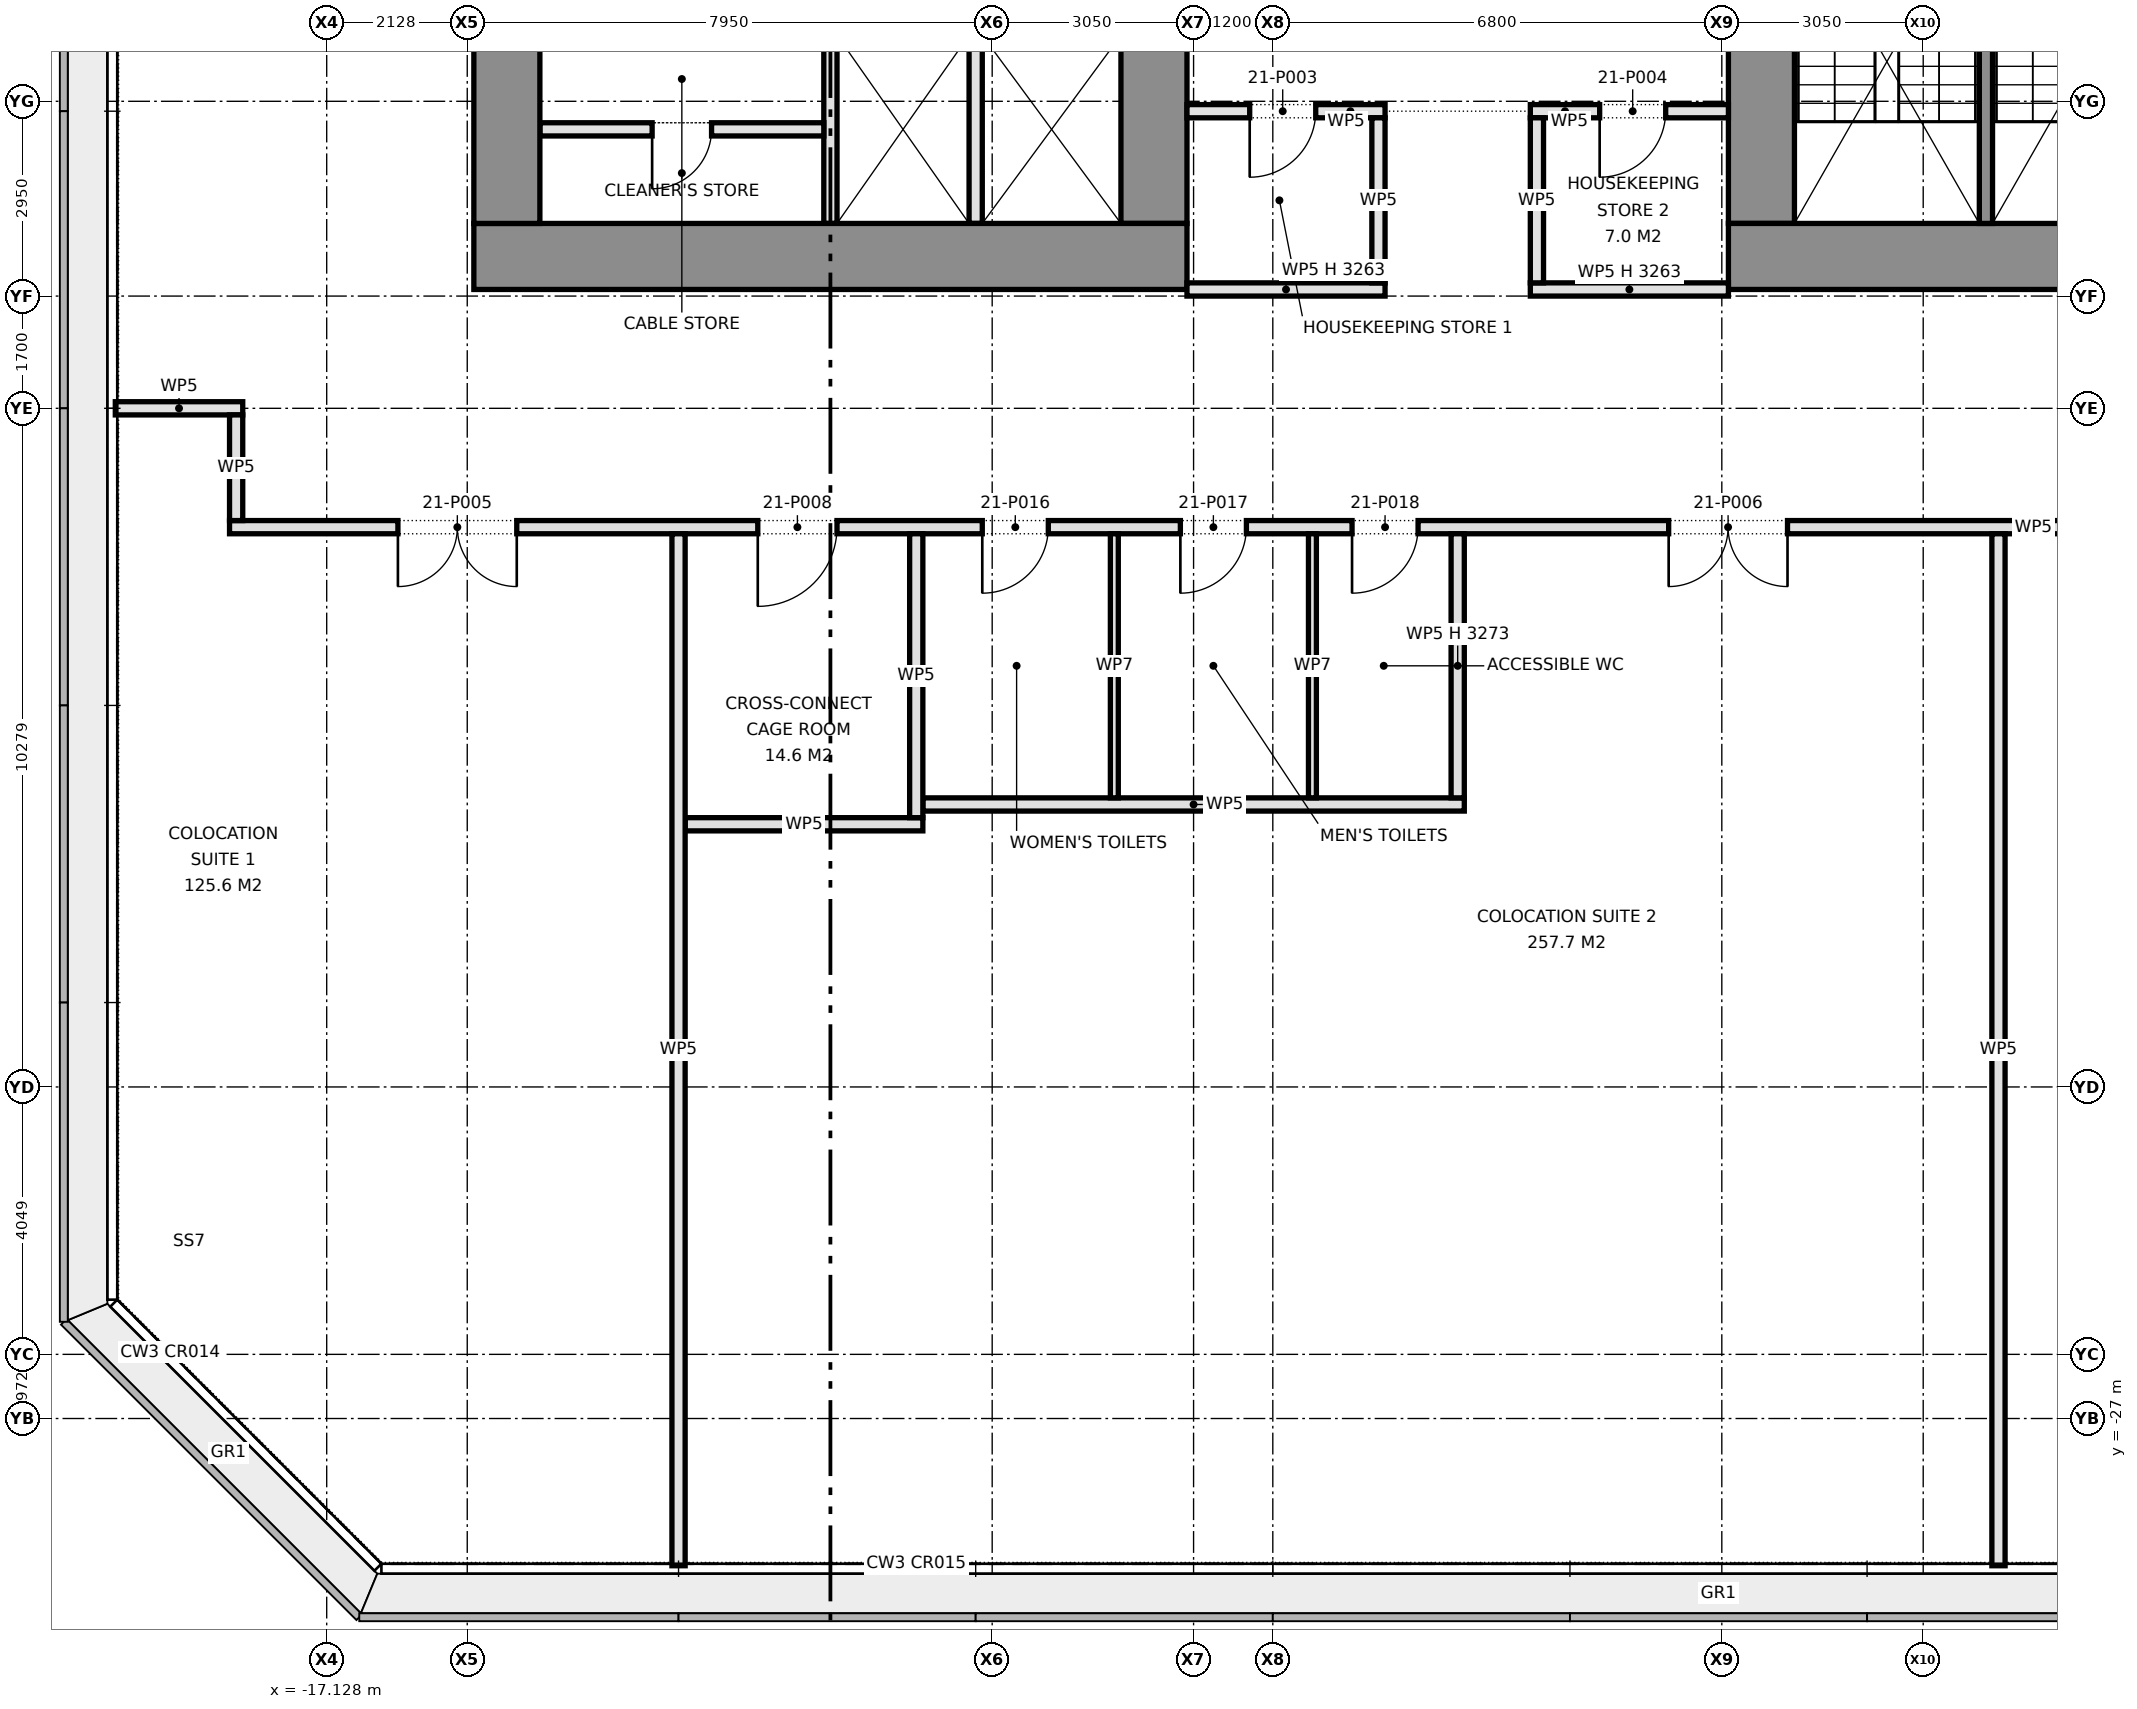
"""IFC4 building model, lengths in metres.
Left out: names, types, materials, properties, quantities, classifications, styles, units other than length and angle.
Written with IfcOpenShell. Run it as: python <this file> out.ifc"""

import sys

from ifc_helpers import new_model, si_unit, direction, frame, frame_2d, origin, place, context, subcontext, project, spatial, rectangle, extrude, element, fill, save


model = new_model("IFC4")
c1 = context("Model", 3, precision=1e-05, world=origin(), true_north=direction((0.0, 1.0)))
c2 = subcontext(c1, "Body", "Model", "MODEL_VIEW")
j1 = project(units=[si_unit("LENGTHUNIT", "METRE"), si_unit("PLANEANGLEUNIT", "RADIAN")], contexts=[c1])
p1 = place(None, origin())
s1 = spatial("IfcSite", under=j1, at=p1, CompositionType="ELEMENT")
p2 = place(p1, origin())
s2 = spatial("IfcBuilding", under=s1, at=p2, CompositionType="ELEMENT")
p3 = place(p2, frame((0.0, 0.0, 95.2)))
s3 = spatial("IfcBuildingStorey", under=s2, at=p3, CompositionType="ELEMENT", Elevation=95.2)
p4 = place(p3, frame((-14.9, -9.4, 0.0), z_axis=(0.0, 0.0, 1.0), x_axis=(1.0, 0.0, 0.0)))
e1 = element("IfcWall", 1, at=p4, inside=s3, PredefinedType="SHEAR", context=c2, shape_type="SweptSolid", body=[
    extrude(rectangle(XDim=10.8, YDim=1.0, at=frame_2d((5.4, 0.0))), origin(), (0.0, 0.0, 1.0), 4.2),
])
for number, where, z_axis, x_axis in (
    (2, (-14.4, -8.9, 0.0), (0.0, 0.0, 1.0), (0.0, 1.0, 0.0)),
    (3, (-4.6, -8.9, 0.0), (0.0, 0.0, 1.0), (0.0, 1.0, 0.0)),
):
    element("IfcWall", number, at=place(p3, frame(where, z_axis=z_axis, x_axis=x_axis)), inside=s3, PredefinedType="SHEAR", context=c2, shape_type="SweptSolid", body=[
        extrude(rectangle(XDim=3.15, YDim=1.0, at=frame_2d((1.575, 0.0))), origin(), (0.0, 0.0, 1.0), 4.2),
    ])
for number, where, z_axis, x_axis in (
    (4, (-9.5, -8.9, 0.0), (0.0, 0.0, 1.0), (0.0, 1.0, 0.0)),
    (5, (-7.3, -8.9, 0.0), (0.0, 0.0, 1.0), (0.0, 1.0, 0.0)),
):
    element("IfcWall", number, at=place(p3, frame(where, z_axis=z_axis, x_axis=x_axis)), inside=s3, PredefinedType="PARTITIONING", context=c2, shape_type="SweptSolid", body=[
        extrude(rectangle(XDim=2.85, YDim=0.2, at=frame_2d((1.425, 0.0))), origin(), (0.0, 0.0, 1.0), 4.2),
    ])
p5 = place(p3, frame((-13.9, -7.475, 0.0), z_axis=(0.0, 0.0, 1.0), x_axis=(1.0, 0.0, 0.0)))
e6 = element("IfcWall", 6, at=p5, inside=s3, PredefinedType="PARTITIONING", context=c2, shape_type="SweptSolid", body=[
    extrude(rectangle(XDim=4.3, YDim=0.2, at=frame_2d((2.15, 0.0))), origin(), (0.0, 0.0, 1.0), 4.2),
])
p6 = place(p5, frame((1.7, 0.0, 0.0)))
e7 = element("IfcOpeningElement", 7, at=p6, cuts=e6, PredefinedType="OPENING", context=c2, shape_type="SweptSolid", body=[
    extrude(rectangle(XDim=0.9, YDim=2.1, at=frame_2d((0.45, 1.05))), frame((0.0, 0.11, 0.0), z_axis=(0.0, -1.0, 0.0), x_axis=(1.0, 0.0, 0.0)), (0.0, 0.0, 1.0), 0.22),
])
p7 = place(p3, frame((14.9, -9.4, 0.0), z_axis=(0.0, 0.0, 1.0), x_axis=(-1.0, 0.0, 0.0)))
e8 = element("IfcWall", 8, at=p7, inside=s3, PredefinedType="SHEAR", context=c2, shape_type="SweptSolid", body=[
    extrude(rectangle(XDim=10.8, YDim=1.0, at=frame_2d((5.4, 0.0))), origin(), (0.0, 0.0, 1.0), 4.2),
])
p8 = place(p3, frame((4.6, -1.55, 0.0), z_axis=(0.0, 0.0, 1.0), x_axis=(0.0, -1.0, 0.0)))
e9 = element("IfcWall", 9, at=p8, inside=s3, PredefinedType="SHEAR", context=c2, shape_type="SweptSolid", body=[
    extrude(rectangle(XDim=7.35, YDim=1.0, at=frame_2d((3.675, 0.0))), origin(), (0.0, 0.0, 1.0), 4.2),
])
p9 = place(p3, frame((8.0, -2.38, 0.0), z_axis=(0.0, 0.0, 1.0), x_axis=(0.0, -1.0, 0.0)))
e10 = element("IfcWall", 10, at=p9, inside=s3, PredefinedType="SHEAR", context=c2, shape_type="SweptSolid", body=[
    extrude(rectangle(XDim=6.52, YDim=0.2, at=frame_2d((3.26, 0.0))), origin(), (0.0, 0.0, 1.0), 4.2),
])
p10 = place(p3, frame((-11.7, -18.0, 0.0), z_axis=(0.0, 0.0, 1.0), x_axis=(1.0, 0.0, 0.0)))
e11 = element("IfcWall", 11, at=p10, inside=s3, PredefinedType="PARTITIONING", context=c2, shape_type="SweptSolid", body=[
    extrude(rectangle(XDim=3.6, YDim=0.2, at=frame_2d((1.8, 0.0))), origin(), (0.0, 0.0, 1.0), 4.2),
])
p11 = place(p3, frame((-8.1, -17.7, 0.0), z_axis=(0.0, 0.0, 1.0), x_axis=(1.0, 0.0, 0.0)))
e12 = element("IfcWall", 12, at=p11, inside=s3, PredefinedType="PARTITIONING", context=c2, shape_type="SweptSolid", body=[
    extrude(rectangle(XDim=8.2, YDim=0.2, at=frame_2d((4.1, 0.0))), origin(), (0.0, 0.0, 1.0), 4.2),
])
p12 = place(p3, frame((-18.6, -13.5, 0.0), z_axis=(0.0, 0.0, 1.0), x_axis=(1.0, 0.0, 0.0)))
e13 = element("IfcWall", 13, at=p12, inside=s3, PredefinedType="PARTITIONING", context=c2, shape_type="SweptSolid", body=[
    extrude(rectangle(XDim=37.2, YDim=0.2, at=frame_2d((18.6, 0.0))), origin(), (0.0, 0.0, 1.0), 4.2),
])
p13 = place(p12, frame((2.55, 0.0, 0.0)))
e14 = element("IfcOpeningElement", 14, at=p13, cuts=e13, PredefinedType="OPENING", context=c2, shape_type="SweptSolid", body=[
    extrude(rectangle(XDim=1.8, YDim=2.1, at=frame_2d((0.9, 1.05))), frame((0.0, 0.11, 0.0), z_axis=(0.0, -1.0, 0.0), x_axis=(1.0, 0.0, 0.0)), (0.0, 0.0, 1.0), 0.22),
])
p14 = place(p12, frame((21.795, 0.0, 0.0)))
e15 = element("IfcOpeningElement", 15, at=p14, cuts=e13, PredefinedType="OPENING", context=c2, shape_type="SweptSolid", body=[
    extrude(rectangle(XDim=1.8, YDim=2.1, at=frame_2d((0.9, 1.05))), frame((0.0, 0.11, 0.0), z_axis=(0.0, -1.0, 0.0), x_axis=(1.0, 0.0, 0.0)), (0.0, 0.0, 1.0), 0.22),
])
p15 = place(p12, frame((31.045, 0.0, 0.0)))
e16 = element("IfcOpeningElement", 16, at=p15, cuts=e13, PredefinedType="OPENING", context=c2, shape_type="SweptSolid", body=[
    extrude(rectangle(XDim=1.8, YDim=2.1, at=frame_2d((0.9, 1.05))), frame((0.0, 0.11, 0.0), z_axis=(0.0, -1.0, 0.0), x_axis=(1.0, 0.0, 0.0)), (0.0, 0.0, 1.0), 0.22),
])
p16 = place(p12, frame((8.0, 0.0, 0.0)))
e17 = element("IfcOpeningElement", 17, at=p16, cuts=e13, PredefinedType="OPENING", context=c2, shape_type="SweptSolid", body=[
    extrude(rectangle(XDim=1.2, YDim=2.1, at=frame_2d((0.6, 1.05))), frame((0.0, 0.11, 0.0), z_axis=(0.0, -1.0, 0.0), x_axis=(1.0, 0.0, 0.0)), (0.0, 0.0, 1.0), 0.22),
])
p17 = place(p12, frame((11.4, 0.0, 0.0)))
e18 = element("IfcOpeningElement", 18, at=p17, cuts=e13, PredefinedType="OPENING", context=c2, shape_type="SweptSolid", body=[
    extrude(rectangle(XDim=1.0, YDim=2.1, at=frame_2d((0.5, 1.05))), frame((0.0, 0.11, 0.0), z_axis=(0.0, -1.0, 0.0), x_axis=(1.0, 0.0, 0.0)), (0.0, 0.0, 1.0), 0.22),
])
p18 = place(p12, frame((14.4, 0.0, 0.0)))
e19 = element("IfcOpeningElement", 19, at=p18, cuts=e13, PredefinedType="OPENING", context=c2, shape_type="SweptSolid", body=[
    extrude(rectangle(XDim=1.0, YDim=2.1, at=frame_2d((0.5, 1.05))), frame((0.0, 0.11, 0.0), z_axis=(0.0, -1.0, 0.0), x_axis=(1.0, 0.0, 0.0)), (0.0, 0.0, 1.0), 0.22),
])
p19 = place(p12, frame((17.0, 0.0, 0.0)))
e20 = element("IfcOpeningElement", 20, at=p19, cuts=e13, PredefinedType="OPENING", context=c2, shape_type="SweptSolid", body=[
    extrude(rectangle(XDim=1.0, YDim=2.1, at=frame_2d((0.5, 1.05))), frame((0.0, 0.11, 0.0), z_axis=(0.0, -1.0, 0.0), x_axis=(1.0, 0.0, 0.0)), (0.0, 0.0, 1.0), 0.22),
])
p20 = place(p3, frame((-20.33, -11.7, 0.0), z_axis=(0.0, 0.0, 1.0), x_axis=(1.0, 0.0, 0.0)))
e21 = element("IfcWall", 21, at=p20, inside=s3, PredefinedType="PARTITIONING", context=c2, shape_type="SweptSolid", body=[
    extrude(rectangle(XDim=1.93, YDim=0.2, at=frame_2d((0.965, 0.0))), origin(), (0.0, 0.0, 1.0), 4.2),
])
for number, where, z_axis, x_axis in (
    (22, (-4.1, -9.9, 0.0), (0.0, 0.0, 1.0), (1.0, 0.0, 0.0)),
    (23, (1.1, -9.9, 0.0), (0.0, 0.0, 1.0), (1.0, 0.0, 0.0)),
):
    element("IfcWall", number, at=place(p3, frame(where, z_axis=z_axis, x_axis=x_axis)), inside=s3, PredefinedType="PARTITIONING", context=c2, shape_type="SweptSolid", body=[
        extrude(rectangle(XDim=3.0, YDim=0.2, at=frame_2d((1.5, 0.0))), origin(), (0.0, 0.0, 1.0), 3.263),
    ])
p21 = place(p3, frame((-4.1, -7.2, 0.0), z_axis=(0.0, 0.0, 1.0), x_axis=(1.0, 0.0, 0.0)))
e24 = element("IfcWall", 24, at=p21, inside=s3, PredefinedType="PARTITIONING", context=c2, shape_type="SweptSolid", body=[
    extrude(rectangle(XDim=3.0, YDim=0.2, at=frame_2d((1.5, 0.0))), origin(), (0.0, 0.0, 1.0), 4.2),
])
p22 = place(p21, frame((0.95, 0.0, 0.0)))
e25 = element("IfcOpeningElement", 25, at=p22, cuts=e24, PredefinedType="OPENING", context=c2, shape_type="SweptSolid", body=[
    extrude(rectangle(XDim=1.0, YDim=2.1, at=frame_2d((0.5, 1.05))), frame((0.0, 0.11, 0.0), z_axis=(0.0, -1.0, 0.0), x_axis=(1.0, 0.0, 0.0)), (0.0, 0.0, 1.0), 0.22),
])
p23 = place(p3, frame((1.1, -7.2, 0.0), z_axis=(0.0, 0.0, 1.0), x_axis=(1.0, 0.0, 0.0)))
e26 = element("IfcWall", 26, at=p23, inside=s3, PredefinedType="PARTITIONING", context=c2, shape_type="SweptSolid", body=[
    extrude(rectangle(XDim=3.0, YDim=0.2, at=frame_2d((1.5, 0.0))), origin(), (0.0, 0.0, 1.0), 4.2),
])
p24 = place(p23, frame((1.05, 0.0, 0.0)))
e27 = element("IfcOpeningElement", 27, at=p24, cuts=e26, PredefinedType="OPENING", context=c2, shape_type="SweptSolid", body=[
    extrude(rectangle(XDim=1.0, YDim=2.1, at=frame_2d((0.5, 1.05))), frame((0.0, 0.11, 0.0), z_axis=(0.0, -1.0, 0.0), x_axis=(1.0, 0.0, 0.0)), (0.0, 0.0, 1.0), 0.22),
])
p25 = place(p3, frame((8.19, -29.23, 0.0), z_axis=(0.0, 0.0, 1.0), x_axis=(0.0, 1.0, 0.0)))
e28 = element("IfcWall", 28, at=p25, inside=s3, PredefinedType="PARTITIONING", context=c2, shape_type="SweptSolid", body=[
    extrude(rectangle(XDim=15.63, YDim=0.2, at=frame_2d((7.815, 0.0))), origin(), (0.0, 0.0, 1.0), 4.2),
])
p26 = place(p3, frame((1.2, -9.8, 0.0), z_axis=(0.0, 0.0, 1.0), x_axis=(0.0, 1.0, 0.0)))
e29 = element("IfcWall", 29, at=p26, inside=s3, PredefinedType="PARTITIONING", context=c2, shape_type="SweptSolid", body=[
    extrude(rectangle(XDim=2.5, YDim=0.2, at=frame_2d((1.25, 0.0))), origin(), (0.0, 0.0, 1.0), 4.2),
])
p27 = place(p3, frame((0.0, -17.6, 0.0), z_axis=(0.0, 0.0, 1.0), x_axis=(0.0, 1.0, 0.0)))
e30 = element("IfcWall", 30, at=p27, inside=s3, PredefinedType="PARTITIONING", context=c2, shape_type="SweptSolid", body=[
    extrude(rectangle(XDim=4.0, YDim=0.2, at=frame_2d((2.0, 0.0))), origin(), (0.0, 0.0, 1.0), 3.273),
])
p28 = place(p3, frame((-1.2, -9.8, 0.0), z_axis=(0.0, 0.0, 1.0), x_axis=(0.0, 1.0, 0.0)))
e31 = element("IfcWall", 31, at=p28, inside=s3, PredefinedType="PARTITIONING", context=c2, shape_type="SweptSolid", body=[
    extrude(rectangle(XDim=2.5, YDim=0.2, at=frame_2d((1.25, 0.0))), origin(), (0.0, 0.0, 1.0), 4.2),
])
p29 = place(p3, frame((-8.2, -17.9, 0.0), z_axis=(0.0, 0.0, 1.0), x_axis=(0.0, 1.0, 0.0)))
e32 = element("IfcWall", 32, at=p29, inside=s3, PredefinedType="PARTITIONING", context=c2, shape_type="SweptSolid", body=[
    extrude(rectangle(XDim=4.3, YDim=0.2, at=frame_2d((2.15, 0.0))), origin(), (0.0, 0.0, 1.0), 4.2),
])
p30 = place(p3, frame((-11.8, -29.23, 0.0), z_axis=(0.0, 0.0, 1.0), x_axis=(0.0, 1.0, 0.0)))
e33 = element("IfcWall", 33, at=p30, inside=s3, PredefinedType="PARTITIONING", context=c2, shape_type="SweptSolid", body=[
    extrude(rectangle(XDim=15.63, YDim=0.2, at=frame_2d((7.815, 0.0))), origin(), (0.0, 0.0, 1.0), 4.2),
])
p31 = place(p3, frame((-18.5, -13.4, 0.0), z_axis=(0.0, 0.0, 1.0), x_axis=(0.0, 1.0, 0.0)))
e34 = element("IfcWall", 34, at=p31, inside=s3, PredefinedType="PARTITIONING", context=c2, shape_type="SweptSolid", body=[
    extrude(rectangle(XDim=1.6, YDim=0.2, at=frame_2d((0.8, 0.0))), origin(), (0.0, 0.0, 1.0), 4.2),
])
for number, where, z_axis, x_axis in (
    (35, (-2.2, -17.6, 0.0), (0.0, 0.0, 1.0), (0.0, 1.0, 0.0)),
    (36, (-5.2, -17.6, 0.0), (0.0, 0.0, 1.0), (0.0, 1.0, 0.0)),
):
    element("IfcWall", number, at=place(p3, frame(where, z_axis=z_axis, x_axis=x_axis)), inside=s3, PredefinedType="PARTITIONING", context=c2, shape_type="SweptSolid", body=[
        extrude(rectangle(XDim=4.0, YDim=0.12, at=frame_2d((2.0, 0.0))), origin(), (0.0, 0.0, 1.0), 4.2),
    ])
p32 = place(p6, frame((0.9, 0.0, 0.0), z_axis=(0.0, 0.0, 1.0), x_axis=(-1.0, 0.0, 0.0)))
e37 = element("IfcDoor", 37, at=p32, inside=s3, OperationType="SINGLE_SWING_RIGHT", PredefinedType="DOOR", context=c2, shape_type="SweptSolid", body=[
    extrude(rectangle(XDim=0.9, YDim=2.1, at=frame_2d((0.45, 1.05))), frame((0.0, 0.025, 0.0), z_axis=(0.0, -1.0, 0.0), x_axis=(1.0, 0.0, 0.0)), (0.0, 0.0, 1.0), 0.05),
])
fill(e7, e37)
p33 = place(p22, frame((1.0, 0.0, 0.0), z_axis=(0.0, 0.0, 1.0), x_axis=(-1.0, 0.0, 0.0)))
e38 = element("IfcDoor", 38, at=p33, inside=s3, OperationType="SINGLE_SWING_RIGHT", PredefinedType="DOOR", context=c2, shape_type="SweptSolid", body=[
    extrude(rectangle(XDim=1.0, YDim=2.1, at=frame_2d((0.5, 1.05))), frame((0.0, 0.025, 0.0), z_axis=(0.0, -1.0, 0.0), x_axis=(1.0, 0.0, 0.0)), (0.0, 0.0, 1.0), 0.05),
])
fill(e25, e38)
p34 = place(p24, frame((1.0, 0.0, 0.0), z_axis=(0.0, 0.0, 1.0), x_axis=(-1.0, 0.0, 0.0)))
e39 = element("IfcDoor", 39, at=p34, inside=s3, OperationType="SINGLE_SWING_RIGHT", PredefinedType="DOOR", context=c2, shape_type="SweptSolid", body=[
    extrude(rectangle(XDim=1.0, YDim=2.1, at=frame_2d((0.5, 1.05))), frame((0.0, 0.025, 0.0), z_axis=(0.0, -1.0, 0.0), x_axis=(1.0, 0.0, 0.0)), (0.0, 0.0, 1.0), 0.05),
])
fill(e27, e39)
p35 = place(p13, frame((1.8, 0.0, 0.0), z_axis=(0.0, 0.0, 1.0), x_axis=(-1.0, 0.0, 0.0)))
e40 = element("IfcDoor", 40, at=p35, inside=s3, OperationType="DOUBLE_DOOR_SINGLE_SWING", PredefinedType="DOOR", context=c2, shape_type="SweptSolid", body=[
    extrude(rectangle(XDim=1.8, YDim=2.1, at=frame_2d((0.9, 1.05))), frame((0.0, 0.025, 0.0), z_axis=(0.0, -1.0, 0.0), x_axis=(1.0, 0.0, 0.0)), (0.0, 0.0, 1.0), 0.05),
])
fill(e14, e40)
p36 = place(p14, frame((1.8, 0.0, 0.0), z_axis=(0.0, 0.0, 1.0), x_axis=(-1.0, 0.0, 0.0)))
e41 = element("IfcDoor", 41, at=p36, inside=s3, OperationType="DOUBLE_DOOR_SINGLE_SWING", PredefinedType="DOOR", context=c2, shape_type="SweptSolid", body=[
    extrude(rectangle(XDim=1.8, YDim=2.1, at=frame_2d((0.9, 1.05))), frame((0.0, 0.025, 0.0), z_axis=(0.0, -1.0, 0.0), x_axis=(1.0, 0.0, 0.0)), (0.0, 0.0, 1.0), 0.05),
])
fill(e15, e41)
p37 = place(p16, frame((1.2, 0.0, 0.0), z_axis=(0.0, 0.0, 1.0), x_axis=(-1.0, 0.0, 0.0)))
e42 = element("IfcDoor", 42, at=p37, inside=s3, OperationType="SINGLE_SWING_RIGHT", PredefinedType="DOOR", context=c2, shape_type="SweptSolid", body=[
    extrude(rectangle(XDim=1.2, YDim=2.1, at=frame_2d((0.6, 1.05))), frame((0.0, 0.025, 0.0), z_axis=(0.0, -1.0, 0.0), x_axis=(1.0, 0.0, 0.0)), (0.0, 0.0, 1.0), 0.05),
])
fill(e17, e42)
p38 = place(p17, frame((1.0, 0.0, 0.0), z_axis=(0.0, 0.0, 1.0), x_axis=(-1.0, 0.0, 0.0)))
e43 = element("IfcDoor", 43, at=p38, inside=s3, OperationType="SINGLE_SWING_RIGHT", PredefinedType="DOOR", context=c2, shape_type="SweptSolid", body=[
    extrude(rectangle(XDim=1.0, YDim=2.1, at=frame_2d((0.5, 1.05))), frame((0.0, 0.025, 0.0), z_axis=(0.0, -1.0, 0.0), x_axis=(1.0, 0.0, 0.0)), (0.0, 0.0, 1.0), 0.05),
])
fill(e18, e43)
p39 = place(p18, frame((1.0, 0.0, 0.0), z_axis=(0.0, 0.0, 1.0), x_axis=(-1.0, 0.0, 0.0)))
e44 = element("IfcDoor", 44, at=p39, inside=s3, OperationType="SINGLE_SWING_RIGHT", PredefinedType="DOOR", context=c2, shape_type="SweptSolid", body=[
    extrude(rectangle(XDim=1.0, YDim=2.1, at=frame_2d((0.5, 1.05))), frame((0.0, 0.025, 0.0), z_axis=(0.0, -1.0, 0.0), x_axis=(1.0, 0.0, 0.0)), (0.0, 0.0, 1.0), 0.05),
])
fill(e19, e44)
p40 = place(p19, frame((1.0, 0.0, 0.0), z_axis=(0.0, 0.0, 1.0), x_axis=(-1.0, 0.0, 0.0)))
e45 = element("IfcDoor", 45, at=p40, inside=s3, OperationType="SINGLE_SWING_RIGHT", PredefinedType="DOOR", context=c2, shape_type="SweptSolid", body=[
    extrude(rectangle(XDim=1.0, YDim=2.1, at=frame_2d((0.5, 1.05))), frame((0.0, 0.025, 0.0), z_axis=(0.0, -1.0, 0.0), x_axis=(1.0, 0.0, 0.0)), (0.0, 0.0, 1.0), 0.05),
])
fill(e20, e45)
save(model, sys.argv[1])
